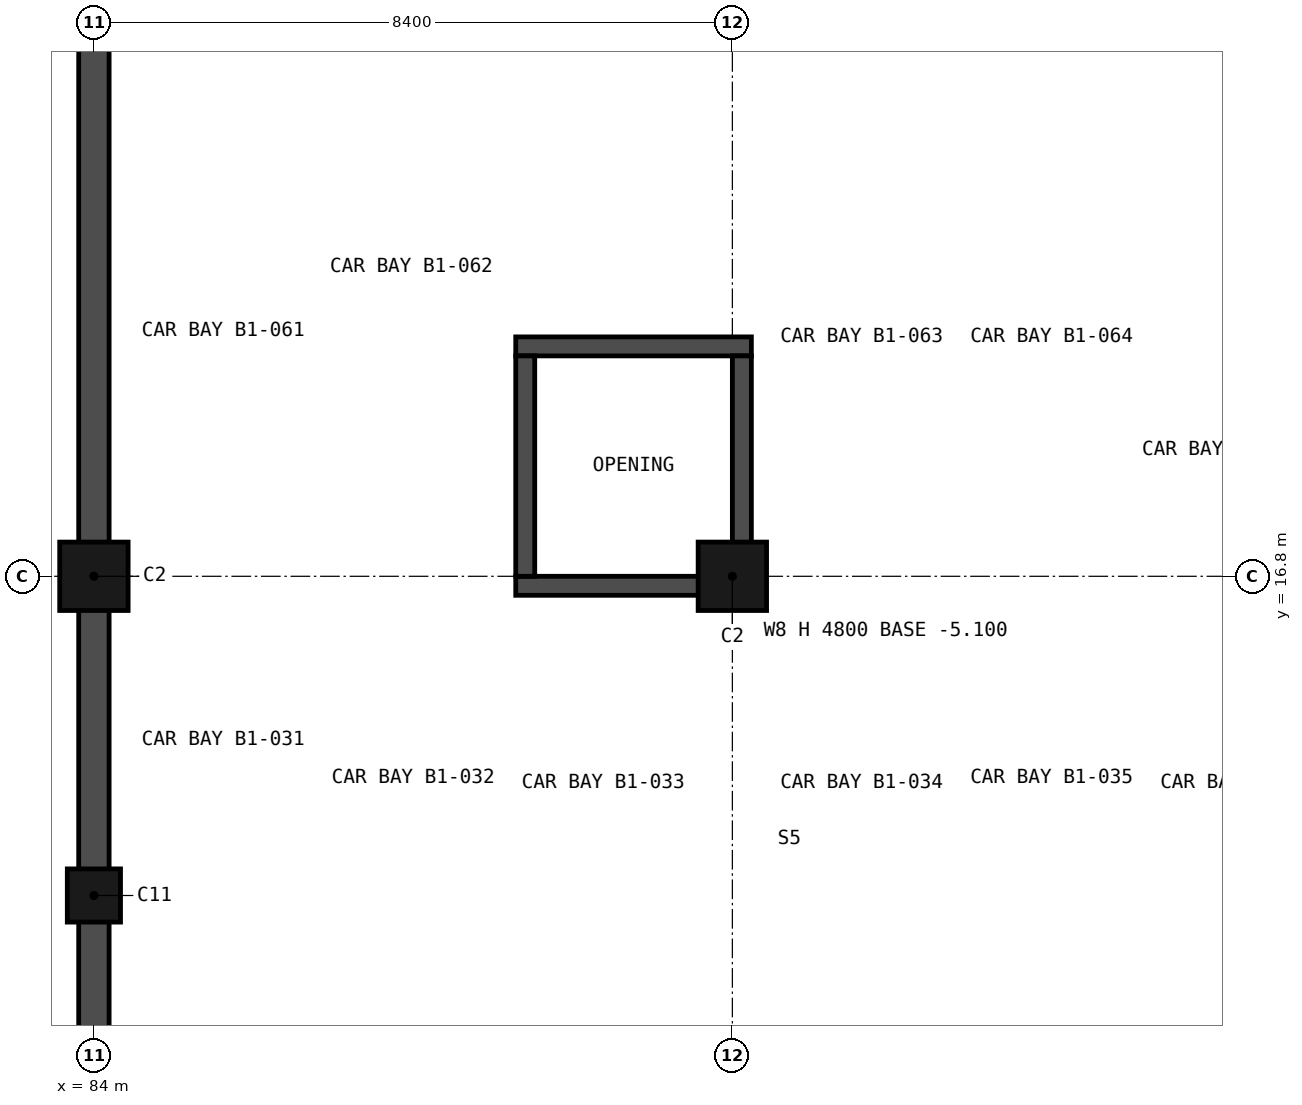
"""IFC4 building model, lengths in metres.
Left out: names, types, materials, properties, quantities, classifications, styles, units other than length and angle.
Written with IfcOpenShell. Run it as: python <this file> out.ifc"""

import sys

from ifc_helpers import new_model, si_unit, direction, frame, frame_2d, origin, origin_2d, place, context, subcontext, project, spatial, rectangle, circle, extrude, element, save


model = new_model("IFC4")
c1 = context("Model", 3, precision=1e-05, world=origin(), true_north=direction((0.0, 1.0)))
c2 = subcontext(c1, "Body", "Model", "MODEL_VIEW")
j1 = project(units=[si_unit("LENGTHUNIT", "METRE"), si_unit("PLANEANGLEUNIT", "RADIAN")], contexts=[c1])
p1 = place(None, origin())
s1 = spatial("IfcSite", under=j1, at=p1, CompositionType="ELEMENT")
p2 = place(p1, origin())
s2 = spatial("IfcBuilding", under=s1, at=p2, CompositionType="ELEMENT")
p3 = place(p2, frame((0.0, 0.0, -4.8)))
s3 = spatial("IfcBuildingStorey", under=s2, at=p3, CompositionType="ELEMENT", Elevation=-4.8)
for number, where, z_axis, x_axis in (
    (1, (84.0, 16.8, -0.3), (0.0, 0.0, 1.0), (1.0, 0.0, 0.0)),
    (2, (92.4, 16.8, -0.3), (0.0, 0.0, 1.0), (1.0, 0.0, 0.0)),
):
    element("IfcColumn", number, at=place(p3, frame(where, z_axis=z_axis, x_axis=x_axis)), inside=s3, PredefinedType="COLUMN", context=c2, shape_type="SweptSolid", body=[
        extrude(rectangle(XDim=0.9, YDim=0.9, at=origin_2d()), origin(), (0.0, 0.0, 1.0), 4.8),
    ])
p4 = place(p3, frame((84.0, 12.6, -0.3), z_axis=(0.0, 0.0, 1.0), x_axis=(1.0, 0.0, 0.0)))
e3 = element("IfcColumn", 3, at=p4, inside=s3, PredefinedType="COLUMN", context=c2, shape_type="SweptSolid", body=[
    extrude(circle(Radius=0.35, at=origin_2d()), origin(), (0.0, 0.0, 1.0), 4.8),
])
for number, where, z_axis, x_axis in (
    (4, (89.55, 16.675, -0.3), (0.0, 0.0, 1.0), (1.0, 0.0, 0.0)),
    (5, (89.55, 19.825, -0.3), (0.0, 0.0, 1.0), (1.0, 0.0, 0.0)),
):
    element("IfcWall", number, at=place(p3, frame(where, z_axis=z_axis, x_axis=x_axis)), inside=s3, PredefinedType="SHEAR", context=c2, shape_type="SweptSolid", body=[
        extrude(rectangle(XDim=3.1, YDim=0.25, at=frame_2d((1.55, 0.0))), origin(), (0.0, 0.0, 1.0), 4.8),
    ])
for number, where, z_axis, x_axis in (
    (6, (89.675, 16.8, -0.3), (0.0, 0.0, 1.0), (0.0, 1.0, 0.0)),
    (7, (92.525, 16.8, -0.3), (0.0, 0.0, 1.0), (0.0, 1.0, 0.0)),
):
    element("IfcWall", number, at=place(p3, frame(where, z_axis=z_axis, x_axis=x_axis)), inside=s3, PredefinedType="SHEAR", context=c2, shape_type="SweptSolid", body=[
        extrude(rectangle(XDim=2.9, YDim=0.25, at=frame_2d((1.45, 0.0))), origin(), (0.0, 0.0, 1.0), 4.8),
    ])
p5 = place(p3, frame((84.0, 50.6, -0.3), z_axis=(0.0, 0.0, 1.0), x_axis=(0.0, -1.0, 0.0)))
e8 = element("IfcWall", 8, at=p5, inside=s3, PredefinedType="SOLIDWALL", context=c2, shape_type="SweptSolid", body=[
    extrude(rectangle(XDim=50.8, YDim=0.4, at=frame_2d((25.4, 0.0))), origin(), (0.0, 0.0, 1.0), 4.8),
])
save(model, sys.argv[1])
